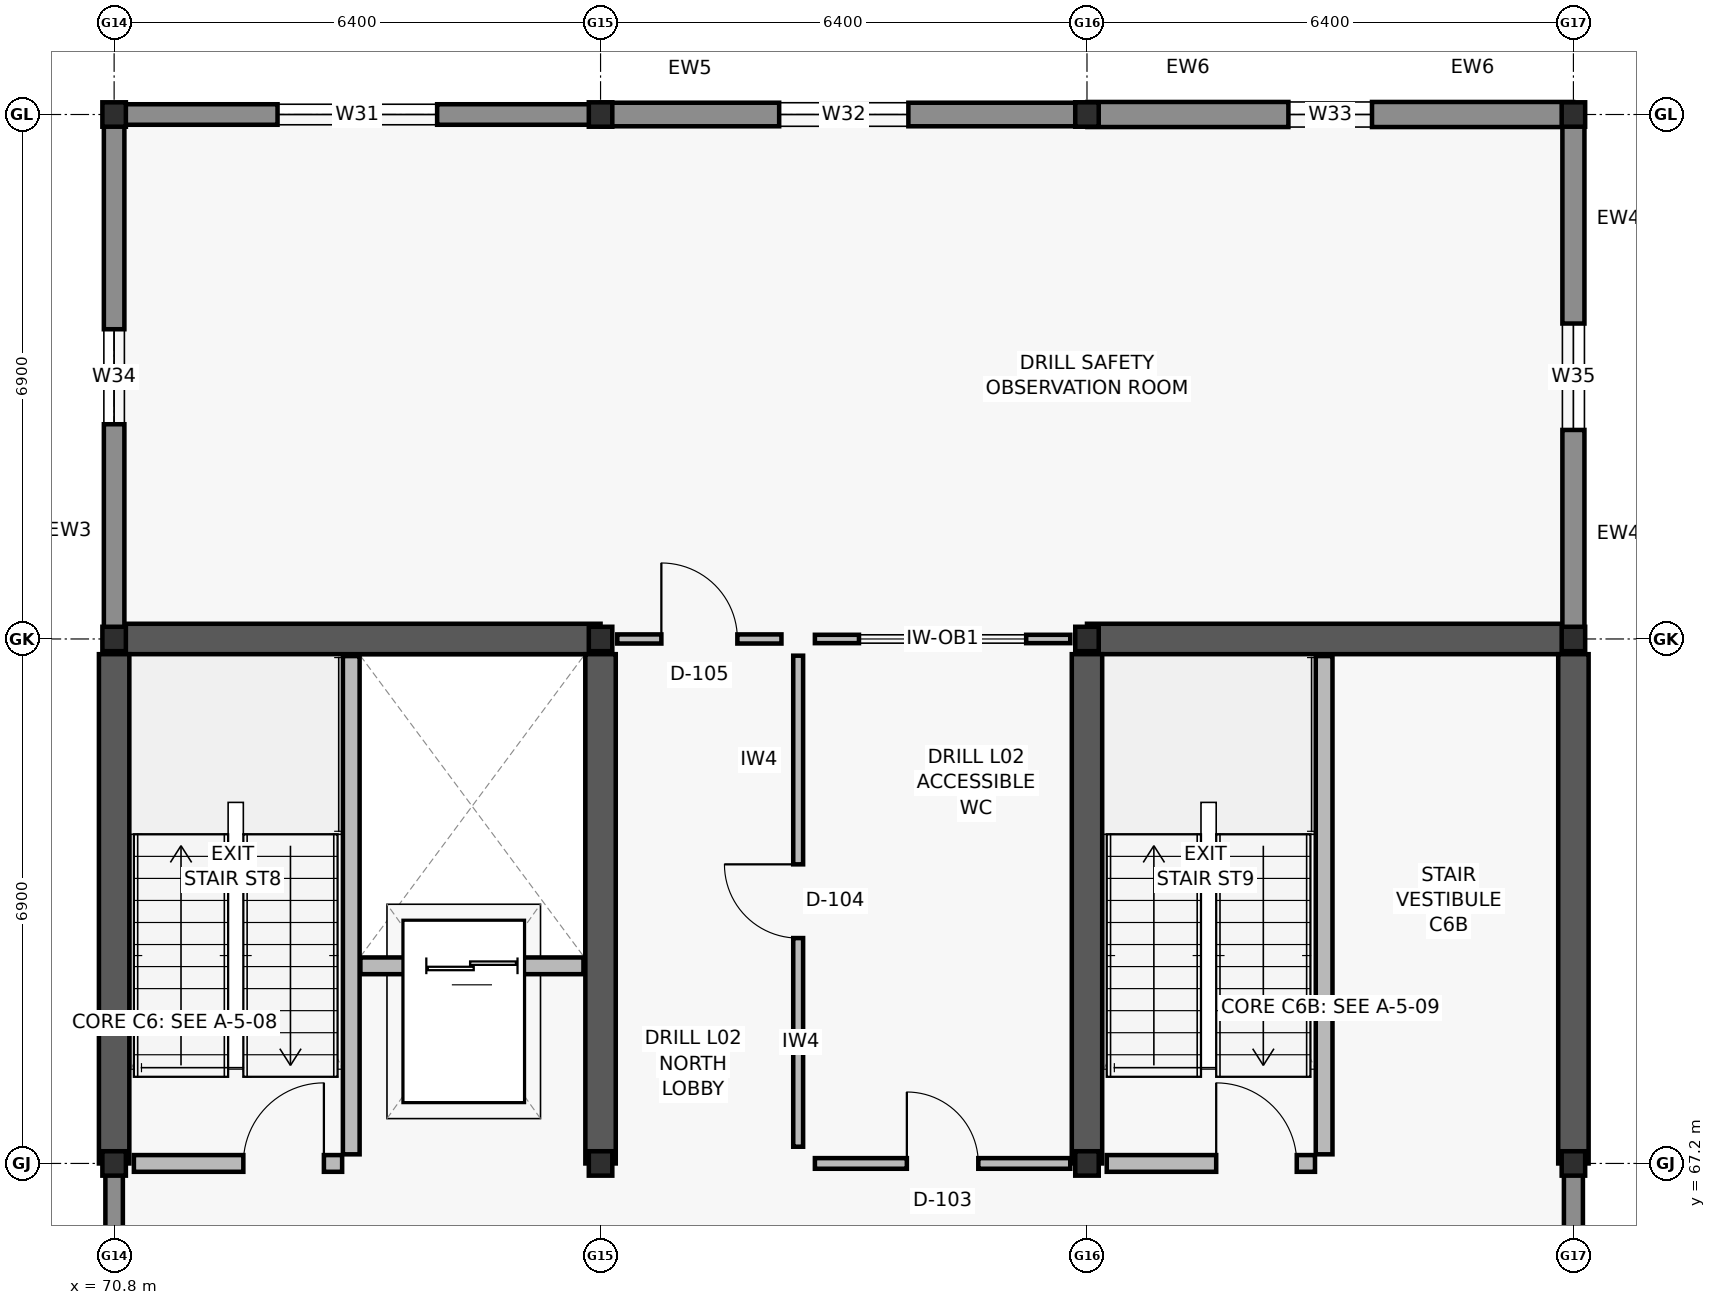
"""IFC4 building model, lengths in metres.
Left out: names, types, materials, properties, quantities, classifications, styles, units other than length and angle.
Written with IfcOpenShell. Run it as: python <this file> out.ifc"""

import sys

from ifc_helpers import new_model, si_unit, direction, frame, frame_2d, origin, origin_2d, place, context, subcontext, project, spatial, rectangle, i_section, extrude, element, fill, save


model = new_model("IFC4")
c1 = context("Model", 3, precision=1e-05, world=origin(), true_north=direction((0.0, 1.0)))
c2 = subcontext(c1, "Body", "Model", "MODEL_VIEW")
j1 = project(units=[si_unit("LENGTHUNIT", "METRE"), si_unit("PLANEANGLEUNIT", "RADIAN")], contexts=[c1])
p1 = place(None, origin())
s1 = spatial("IfcSite", under=j1, at=p1, CompositionType="ELEMENT")
p2 = place(p1, origin())
s2 = spatial("IfcBuilding", under=s1, at=p2, CompositionType="ELEMENT")
p3 = place(p2, frame((0.0, 0.0, 9.6)))
s3 = spatial("IfcBuildingStorey", under=s2, at=p3, CompositionType="ELEMENT", Elevation=9.6)
for number, where, z_axis, x_axis in (
    (1, (70.8, 67.2, 0.0), (0.0, 0.0, 1.0), (1.0, 0.0, 0.0)),
    (2, (70.8, 74.1, 0.0), (0.0, 0.0, 1.0), (1.0, 0.0, 0.0)),
    (3, (70.8, 81.0, 0.0), (0.0, 0.0, 1.0), (1.0, 0.0, 0.0)),
    (4, (77.2, 67.2, 0.0), (0.0, 0.0, 1.0), (1.0, 0.0, 0.0)),
    (5, (77.2, 74.1, 0.0), (0.0, 0.0, 1.0), (1.0, 0.0, 0.0)),
    (6, (77.2, 81.0, 0.0), (0.0, 0.0, 1.0), (1.0, 0.0, 0.0)),
    (7, (83.6, 67.2, 0.0), (0.0, 0.0, 1.0), (1.0, 0.0, 0.0)),
    (8, (83.6, 74.1, 0.0), (0.0, 0.0, 1.0), (1.0, 0.0, 0.0)),
    (9, (83.6, 81.0, 0.0), (0.0, 0.0, 1.0), (1.0, 0.0, 0.0)),
    (10, (90.0, 67.2, 0.0), (0.0, 0.0, 1.0), (1.0, 0.0, 0.0)),
    (11, (90.0, 74.1, 0.0), (0.0, 0.0, 1.0), (1.0, 0.0, 0.0)),
    (12, (90.0, 81.0, 0.0), (0.0, 0.0, 1.0), (1.0, 0.0, 0.0)),
):
    element("IfcColumn", number, at=place(p3, frame(where, z_axis=z_axis, x_axis=x_axis)), inside=s3, PredefinedType="COLUMN", context=c2, shape_type="SweptSolid", body=[
        extrude(i_section(OverallWidth=0.309, OverallDepth=0.321, WebThickness=0.014, FlangeThickness=0.022, FilletRadius=0.017, at=origin_2d()), origin(), (0.0, 0.0, 1.0), 3.9),
    ])
p4 = place(p3, frame((70.8, 74.1, 0.0), z_axis=(0.0, 0.0, 1.0), x_axis=(1.0, 0.0, 0.0)))
e13 = element("IfcWall", 13, at=p4, inside=s3, PredefinedType="SHEAR", context=c2, shape_type="SweptSolid", body=[
    extrude(rectangle(XDim=6.4, YDim=0.4, at=frame_2d((3.2, 0.0))), origin(), (0.0, 0.0, 1.0), 3.66),
])
for number, where, z_axis, x_axis in (
    (14, (70.8, 67.2, 0.0), (0.0, 0.0, 1.0), (0.0, 1.0, 0.0)),
    (15, (77.2, 67.2, 0.0), (0.0, 0.0, 1.0), (0.0, 1.0, 0.0)),
):
    element("IfcWall", number, at=place(p3, frame(where, z_axis=z_axis, x_axis=x_axis)), inside=s3, PredefinedType="SHEAR", context=c2, shape_type="SweptSolid", body=[
        extrude(rectangle(XDim=6.7, YDim=0.4, at=frame_2d((3.35, 0.0))), origin(), (0.0, 0.0, 1.0), 3.66),
    ])
p5 = place(p3, frame((83.6, 74.1, 0.0), z_axis=(0.0, 0.0, 1.0), x_axis=(1.0, 0.0, 0.0)))
e16 = element("IfcWall", 16, at=p5, inside=s3, PredefinedType="SHEAR", context=c2, shape_type="SweptSolid", body=[
    extrude(rectangle(XDim=6.4, YDim=0.4, at=frame_2d((3.2, 0.0))), origin(), (0.0, 0.0, 1.0), 3.66),
])
for number, where, z_axis, x_axis in (
    (17, (83.6, 67.2, 0.0), (0.0, 0.0, 1.0), (0.0, 1.0, 0.0)),
    (18, (90.0, 67.2, 0.0), (0.0, 0.0, 1.0), (0.0, 1.0, 0.0)),
):
    element("IfcWall", number, at=place(p3, frame(where, z_axis=z_axis, x_axis=x_axis)), inside=s3, PredefinedType="SHEAR", context=c2, shape_type="SweptSolid", body=[
        extrude(rectangle(XDim=6.7, YDim=0.4, at=frame_2d((3.35, 0.0))), origin(), (0.0, 0.0, 1.0), 3.66),
    ])
p6 = place(p3, frame((70.805, 81.0, 0.0), z_axis=(0.0, 0.0, 1.0), x_axis=(1.0, 0.0, 0.0)))
e19 = element("IfcWall", 19, at=p6, inside=s3, PredefinedType="SOLIDWALL", context=c2, shape_type="SweptSolid", body=[
    extrude(rectangle(XDim=6.39, YDim=0.27, at=frame_2d((3.195, 0.0))), origin(), (0.0, 0.0, 1.0), 3.02),
])
p7 = place(p6, frame((2.145, 0.0, 0.8)))
e20 = element("IfcOpeningElement", 20, at=p7, cuts=e19, PredefinedType="OPENING", context=c2, shape_type="SweptSolid", body=[
    extrude(rectangle(XDim=2.1, YDim=1.25, at=frame_2d((1.05, 0.625))), frame((0.0, 0.145, 0.0), z_axis=(0.0, -1.0, 0.0), x_axis=(1.0, 0.0, 0.0)), (0.0, 0.0, 1.0), 0.29),
])
p8 = place(p3, frame((77.205, 81.0, 0.0), z_axis=(0.0, 0.0, 1.0), x_axis=(1.0, 0.0, 0.0)))
e21 = element("IfcWall", 21, at=p8, inside=s3, PredefinedType="SOLIDWALL", context=c2, shape_type="SweptSolid", body=[
    extrude(rectangle(XDim=6.39, YDim=0.31, at=frame_2d((3.195, 0.0))), origin(), (0.0, 0.0, 1.0), 3.02),
])
p9 = place(p8, frame((2.345, 0.0, 0.8)))
e22 = element("IfcOpeningElement", 22, at=p9, cuts=e21, PredefinedType="OPENING", context=c2, shape_type="SweptSolid", body=[
    extrude(rectangle(XDim=1.7, YDim=1.25, at=frame_2d((0.85, 0.625))), frame((0.0, 0.165, 0.0), z_axis=(0.0, -1.0, 0.0), x_axis=(1.0, 0.0, 0.0)), (0.0, 0.0, 1.0), 0.33),
])
p10 = place(p3, frame((83.605, 81.0, 0.0), z_axis=(0.0, 0.0, 1.0), x_axis=(1.0, 0.0, 0.0)))
e23 = element("IfcWall", 23, at=p10, inside=s3, PredefinedType="SOLIDWALL", context=c2, shape_type="SweptSolid", body=[
    extrude(rectangle(XDim=6.39, YDim=0.33, at=frame_2d((3.195, 0.0))), origin(), (0.0, 0.0, 1.0), 3.02),
])
p11 = place(p10, frame((2.645, 0.0, 0.8)))
e24 = element("IfcOpeningElement", 24, at=p11, cuts=e23, PredefinedType="OPENING", context=c2, shape_type="SweptSolid", body=[
    extrude(rectangle(XDim=1.1, YDim=1.5, at=frame_2d((0.55, 0.75))), frame((0.0, 0.175, 0.0), z_axis=(0.0, -1.0, 0.0), x_axis=(1.0, 0.0, 0.0)), (0.0, 0.0, 1.0), 0.35),
])
p12 = place(p3, frame((70.8, 60.305, 0.0), z_axis=(0.0, 0.0, 1.0), x_axis=(0.0, 1.0, 0.0)))
e25 = element("IfcWall", 25, at=p12, inside=s3, PredefinedType="SOLIDWALL", context=c2, shape_type="SweptSolid", body=[
    extrude(rectangle(XDim=6.89, YDim=0.23, at=frame_2d((3.445, 0.0))), origin(), (0.0, 0.0, 1.0), 3.02),
])
p13 = place(p3, frame((90.0, 67.195, 0.0), z_axis=(0.0, 0.0, 1.0), x_axis=(0.0, -1.0, 0.0)))
e26 = element("IfcWall", 26, at=p13, inside=s3, PredefinedType="SOLIDWALL", context=c2, shape_type="SweptSolid", body=[
    extrude(rectangle(XDim=6.89, YDim=0.25, at=frame_2d((3.445, 0.0))), origin(), (0.0, 0.0, 1.0), 3.02),
])
p14 = place(p3, frame((70.8, 74.105, 0.0), z_axis=(0.0, 0.0, 1.0), x_axis=(0.0, 1.0, 0.0)))
e27 = element("IfcWall", 27, at=p14, inside=s3, PredefinedType="SOLIDWALL", context=c2, shape_type="SweptSolid", body=[
    extrude(rectangle(XDim=6.89, YDim=0.27, at=frame_2d((3.445, 0.0))), origin(), (0.0, 0.0, 1.0), 3.02),
])
p15 = place(p14, frame((2.82, 0.0, 0.8)))
e28 = element("IfcOpeningElement", 28, at=p15, cuts=e27, PredefinedType="OPENING", context=c2, shape_type="SweptSolid", body=[
    extrude(rectangle(XDim=1.25, YDim=1.5, at=frame_2d((0.625, 0.75))), frame((0.0, 0.145, 0.0), z_axis=(0.0, -1.0, 0.0), x_axis=(1.0, 0.0, 0.0)), (0.0, 0.0, 1.0), 0.29),
])
p16 = place(p3, frame((90.0, 80.995, 0.0), z_axis=(0.0, 0.0, 1.0), x_axis=(0.0, -1.0, 0.0)))
e29 = element("IfcWall", 29, at=p16, inside=s3, PredefinedType="SOLIDWALL", context=c2, shape_type="SweptSolid", body=[
    extrude(rectangle(XDim=6.89, YDim=0.29, at=frame_2d((3.445, 0.0))), origin(), (0.0, 0.0, 1.0), 3.02),
])
p17 = place(p16, frame((2.745, 0.0, 0.8)))
e30 = element("IfcOpeningElement", 30, at=p17, cuts=e29, PredefinedType="OPENING", context=c2, shape_type="SweptSolid", body=[
    extrude(rectangle(XDim=1.4, YDim=1.5, at=frame_2d((0.7, 0.75))), frame((0.0, 0.155, 0.0), z_axis=(0.0, -1.0, 0.0), x_axis=(1.0, 0.0, 0.0)), (0.0, 0.0, 1.0), 0.31),
])
p18 = place(p3, frame((73.92, 67.32, 0.0), z_axis=(0.0, 0.0, 1.0), x_axis=(0.0, 1.0, 0.0)))
e31 = element("IfcWall", 31, at=p18, inside=s3, PredefinedType="SOLIDWALL", context=c2, shape_type="SweptSolid", body=[
    extrude(rectangle(XDim=6.555, YDim=0.22, at=frame_2d((3.277, 0.0))), origin(), (0.0, 0.0, 1.0), 3.66),
])
p19 = place(p3, frame((71.06, 67.2, 0.0), z_axis=(0.0, 0.0, 1.0), x_axis=(1.0, 0.0, 0.0)))
e32 = element("IfcWall", 32, at=p19, inside=s3, PredefinedType="SOLIDWALL", context=c2, shape_type="SweptSolid", body=[
    extrude(rectangle(XDim=2.74, YDim=0.22, at=frame_2d((1.37, 0.0))), origin(), (0.0, 0.0, 1.0), 3.02),
])
p20 = place(p19, frame((1.44, 0.0, 0.0)))
e33 = element("IfcOpeningElement", 33, at=p20, cuts=e32, PredefinedType="OPENING", context=c2, shape_type="SweptSolid", body=[
    extrude(rectangle(XDim=1.06, YDim=2.1, at=frame_2d((0.53, 1.05))), frame((0.0, 0.12, 0.0), z_axis=(0.0, -1.0, 0.0), x_axis=(1.0, 0.0, 0.0)), (0.0, 0.0, 1.0), 0.24),
])
p21 = place(p3, frame((74.04, 69.8, 0.0), z_axis=(0.0, 0.0, 1.0), x_axis=(1.0, 0.0, 0.0)))
e34 = element("IfcWall", 34, at=p21, inside=s3, PredefinedType="SOLIDWALL", context=c2, shape_type="SweptSolid", body=[
    extrude(rectangle(XDim=2.935, YDim=0.22, at=frame_2d((1.468, 0.0))), origin(), (0.0, 0.0, 1.0), 3.66),
])
p22 = place(p21, frame((0.867, 0.0, 0.0)))
e35 = element("IfcOpeningElement", 35, at=p22, cuts=e34, PredefinedType="OPENING", context=c2, shape_type="SweptSolid", body=[
    extrude(rectangle(XDim=1.2, YDim=2.15, at=frame_2d((0.6, 1.075))), frame((0.0, 0.12, 0.0), z_axis=(0.0, -1.0, 0.0), x_axis=(1.0, 0.0, 0.0)), (0.0, 0.0, 1.0), 0.24),
])
p23 = place(p3, frame((86.72, 67.32, 0.0), z_axis=(0.0, 0.0, 1.0), x_axis=(0.0, 1.0, 0.0)))
e36 = element("IfcWall", 36, at=p23, inside=s3, PredefinedType="SOLIDWALL", context=c2, shape_type="SweptSolid", body=[
    extrude(rectangle(XDim=6.555, YDim=0.22, at=frame_2d((3.277, 0.0))), origin(), (0.0, 0.0, 1.0), 3.66),
])
p24 = place(p3, frame((83.86, 67.2, 0.0), z_axis=(0.0, 0.0, 1.0), x_axis=(1.0, 0.0, 0.0)))
e37 = element("IfcWall", 37, at=p24, inside=s3, PredefinedType="SOLIDWALL", context=c2, shape_type="SweptSolid", body=[
    extrude(rectangle(XDim=2.74, YDim=0.22, at=frame_2d((1.37, 0.0))), origin(), (0.0, 0.0, 1.0), 3.02),
])
p25 = place(p24, frame((1.44, 0.0, 0.0)))
e38 = element("IfcOpeningElement", 38, at=p25, cuts=e37, PredefinedType="OPENING", context=c2, shape_type="SweptSolid", body=[
    extrude(rectangle(XDim=1.06, YDim=2.1, at=frame_2d((0.53, 1.05))), frame((0.0, 0.12, 0.0), z_axis=(0.0, -1.0, 0.0), x_axis=(1.0, 0.0, 0.0)), (0.0, 0.0, 1.0), 0.24),
])
p26 = place(p3, frame((80.02, 67.2, 0.0), z_axis=(0.0, 0.0, 1.0), x_axis=(1.0, 0.0, 0.0)))
e39 = element("IfcWall", 39, at=p26, inside=s3, PredefinedType="PARTITIONING", context=c2, shape_type="SweptSolid", body=[
    extrude(rectangle(XDim=3.36, YDim=0.14, at=frame_2d((1.68, 0.0))), origin(), (0.0, 0.0, 1.0), 3.0),
])
p27 = place(p26, frame((1.21, 0.0, 0.0)))
e40 = element("IfcOpeningElement", 40, at=p27, cuts=e39, PredefinedType="OPENING", context=c2, shape_type="SweptSolid", body=[
    extrude(rectangle(XDim=0.94, YDim=2.08, at=frame_2d((0.47, 1.04))), frame((0.0, 0.08, 0.0), z_axis=(0.0, -1.0, 0.0), x_axis=(1.0, 0.0, 0.0)), (0.0, 0.0, 1.0), 0.16),
])
p28 = place(p3, frame((79.8, 67.42, 0.0), z_axis=(0.0, 0.0, 1.0), x_axis=(0.0, 1.0, 0.0)))
e41 = element("IfcWall", 41, at=p28, inside=s3, PredefinedType="PARTITIONING", context=c2, shape_type="SweptSolid", body=[
    extrude(rectangle(XDim=6.46, YDim=0.13, at=frame_2d((3.23, 0.0))), origin(), (0.0, 0.0, 1.0), 3.0),
])
p29 = place(p28, frame((2.745, 0.0, 0.0)))
e42 = element("IfcOpeningElement", 42, at=p29, cuts=e41, PredefinedType="OPENING", context=c2, shape_type="SweptSolid", body=[
    extrude(rectangle(XDim=0.97, YDim=2.1, at=frame_2d((0.485, 1.05))), frame((0.0, 0.075, 0.0), z_axis=(0.0, -1.0, 0.0), x_axis=(1.0, 0.0, 0.0)), (0.0, 0.0, 1.0), 0.15),
])
p30 = place(p3, frame((77.42, 74.1, 0.0), z_axis=(0.0, 0.0, 1.0), x_axis=(1.0, 0.0, 0.0)))
e43 = element("IfcWall", 43, at=p30, inside=s3, PredefinedType="PARTITIONING", context=c2, shape_type="SweptSolid", body=[
    extrude(rectangle(XDim=2.16, YDim=0.12, at=frame_2d((1.08, 0.0))), origin(), (0.0, 0.0, 1.0), 3.0),
])
p31 = place(p30, frame((0.58, 0.0, 0.0)))
e44 = element("IfcOpeningElement", 44, at=p31, cuts=e43, PredefinedType="OPENING", context=c2, shape_type="SweptSolid", body=[
    extrude(rectangle(XDim=1.0, YDim=2.12, at=frame_2d((0.5, 1.06))), frame((0.0, 0.07, 0.0), z_axis=(0.0, -1.0, 0.0), x_axis=(1.0, 0.0, 0.0)), (0.0, 0.0, 1.0), 0.14),
])
p32 = place(p3, frame((80.02, 74.1, 0.0), z_axis=(0.0, 0.0, 1.0), x_axis=(1.0, 0.0, 0.0)))
e45 = element("IfcWall", 45, at=p32, inside=s3, PredefinedType="PARTITIONING", context=c2, shape_type="SweptSolid", body=[
    extrude(rectangle(XDim=3.36, YDim=0.11, at=frame_2d((1.68, 0.0))), origin(), (0.0, 0.0, 1.0), 3.0),
])
p33 = place(p32, frame((0.58, 0.0, 0.95)))
e46 = element("IfcOpeningElement", 46, at=p33, cuts=e45, PredefinedType="OPENING", context=c2, shape_type="SweptSolid", body=[
    extrude(rectangle(XDim=2.2, YDim=1.3, at=frame_2d((1.1, 0.65))), frame((0.0, 0.065, 0.0), z_axis=(0.0, -1.0, 0.0), x_axis=(1.0, 0.0, 0.0)), (0.0, 0.0, 1.0), 0.13),
])
p34 = place(p7, origin())
e47 = element("IfcWindow", 47, at=p34, inside=s3, PartitioningType="DOUBLE_PANEL_VERTICAL", PredefinedType="WINDOW", context=c2, shape_type="SweptSolid", body=[
    extrude(rectangle(XDim=2.1, YDim=1.25, at=frame_2d((1.05, 0.625))), frame((0.0, 0.03, 0.0), z_axis=(0.0, -1.0, 0.0), x_axis=(1.0, 0.0, 0.0)), (0.0, 0.0, 1.0), 0.06),
])
fill(e20, e47)
p35 = place(p9, origin())
e48 = element("IfcWindow", 48, at=p35, inside=s3, PartitioningType="DOUBLE_PANEL_VERTICAL", PredefinedType="WINDOW", context=c2, shape_type="SweptSolid", body=[
    extrude(rectangle(XDim=1.7, YDim=1.25, at=frame_2d((0.85, 0.625))), frame((0.0, 0.03, 0.0), z_axis=(0.0, -1.0, 0.0), x_axis=(1.0, 0.0, 0.0)), (0.0, 0.0, 1.0), 0.06),
])
fill(e22, e48)
p36 = place(p11, origin())
e49 = element("IfcWindow", 49, at=p36, inside=s3, PartitioningType="SINGLE_PANEL", PredefinedType="WINDOW", context=c2, shape_type="SweptSolid", body=[
    extrude(rectangle(XDim=1.1, YDim=1.5, at=frame_2d((0.55, 0.75))), frame((0.0, 0.03, 0.0), z_axis=(0.0, -1.0, 0.0), x_axis=(1.0, 0.0, 0.0)), (0.0, 0.0, 1.0), 0.06),
])
fill(e24, e49)
p37 = place(p15, origin())
e50 = element("IfcWindow", 50, at=p37, inside=s3, PartitioningType="SINGLE_PANEL", PredefinedType="WINDOW", context=c2, shape_type="SweptSolid", body=[
    extrude(rectangle(XDim=1.25, YDim=1.5, at=frame_2d((0.625, 0.75))), frame((0.0, 0.03, 0.0), z_axis=(0.0, -1.0, 0.0), x_axis=(1.0, 0.0, 0.0)), (0.0, 0.0, 1.0), 0.06),
])
fill(e28, e50)
p38 = place(p17, origin())
e51 = element("IfcWindow", 51, at=p38, inside=s3, PartitioningType="SINGLE_PANEL", PredefinedType="WINDOW", context=c2, shape_type="SweptSolid", body=[
    extrude(rectangle(XDim=1.4, YDim=1.5, at=frame_2d((0.7, 0.75))), frame((0.0, 0.03, 0.0), z_axis=(0.0, -1.0, 0.0), x_axis=(1.0, 0.0, 0.0)), (0.0, 0.0, 1.0), 0.06),
])
fill(e30, e51)
p39 = place(p20, origin())
e52 = element("IfcDoor", 52, at=p39, inside=s3, OperationType="SINGLE_SWING_RIGHT", PredefinedType="DOOR", context=c2, shape_type="SweptSolid", body=[
    extrude(rectangle(XDim=1.06, YDim=2.1, at=frame_2d((0.53, 1.05))), frame((0.0, 0.025, 0.0), z_axis=(0.0, -1.0, 0.0), x_axis=(1.0, 0.0, 0.0)), (0.0, 0.0, 1.0), 0.05),
])
fill(e33, e52)
p40 = place(p22, origin())
e53 = element("IfcDoor", 53, at=p40, inside=s3, OperationType="DOUBLE_DOOR_SLIDING", PredefinedType="DOOR", context=c2, shape_type="SweptSolid", body=[
    extrude(rectangle(XDim=1.2, YDim=2.15, at=frame_2d((0.6, 1.075))), frame((0.0, 0.025, 0.0), z_axis=(0.0, -1.0, 0.0), x_axis=(1.0, 0.0, 0.0)), (0.0, 0.0, 1.0), 0.05),
])
fill(e35, e53)
p41 = place(p25, origin())
e54 = element("IfcDoor", 54, at=p41, inside=s3, OperationType="SINGLE_SWING_LEFT", PredefinedType="DOOR", context=c2, shape_type="SweptSolid", body=[
    extrude(rectangle(XDim=1.06, YDim=2.1, at=frame_2d((0.53, 1.05))), frame((0.0, 0.025, 0.0), z_axis=(0.0, -1.0, 0.0), x_axis=(1.0, 0.0, 0.0)), (0.0, 0.0, 1.0), 0.05),
])
fill(e38, e54)
p42 = place(p27, origin())
e55 = element("IfcDoor", 55, at=p42, inside=s3, OperationType="SINGLE_SWING_LEFT", PredefinedType="DOOR", context=c2, shape_type="SweptSolid", body=[
    extrude(rectangle(XDim=0.94, YDim=2.08, at=frame_2d((0.47, 1.04))), frame((0.0, 0.025, 0.0), z_axis=(0.0, -1.0, 0.0), x_axis=(1.0, 0.0, 0.0)), (0.0, 0.0, 1.0), 0.05),
])
fill(e40, e55)
p43 = place(p29, origin())
e56 = element("IfcDoor", 56, at=p43, inside=s3, OperationType="SINGLE_SWING_RIGHT", PredefinedType="DOOR", context=c2, shape_type="SweptSolid", body=[
    extrude(rectangle(XDim=0.97, YDim=2.1, at=frame_2d((0.485, 1.05))), frame((0.0, 0.025, 0.0), z_axis=(0.0, -1.0, 0.0), x_axis=(1.0, 0.0, 0.0)), (0.0, 0.0, 1.0), 0.05),
])
fill(e42, e56)
p44 = place(p31, origin())
e57 = element("IfcDoor", 57, at=p44, inside=s3, OperationType="SINGLE_SWING_LEFT", PredefinedType="DOOR", context=c2, shape_type="SweptSolid", body=[
    extrude(rectangle(XDim=1.0, YDim=2.12, at=frame_2d((0.5, 1.06))), frame((0.0, 0.025, 0.0), z_axis=(0.0, -1.0, 0.0), x_axis=(1.0, 0.0, 0.0)), (0.0, 0.0, 1.0), 0.05),
])
fill(e44, e57)
p45 = place(p33, origin())
e58 = element("IfcWindow", 58, at=p45, inside=s3, PartitioningType="DOUBLE_PANEL_VERTICAL", PredefinedType="WINDOW", context=c2, shape_type="SweptSolid", body=[
    extrude(rectangle(XDim=2.2, YDim=1.3, at=frame_2d((1.1, 0.65))), frame((0.0, 0.03, 0.0), z_axis=(0.0, -1.0, 0.0), x_axis=(1.0, 0.0, 0.0)), (0.0, 0.0, 1.0), 0.06),
])
fill(e46, e58)
save(model, sys.argv[1])
